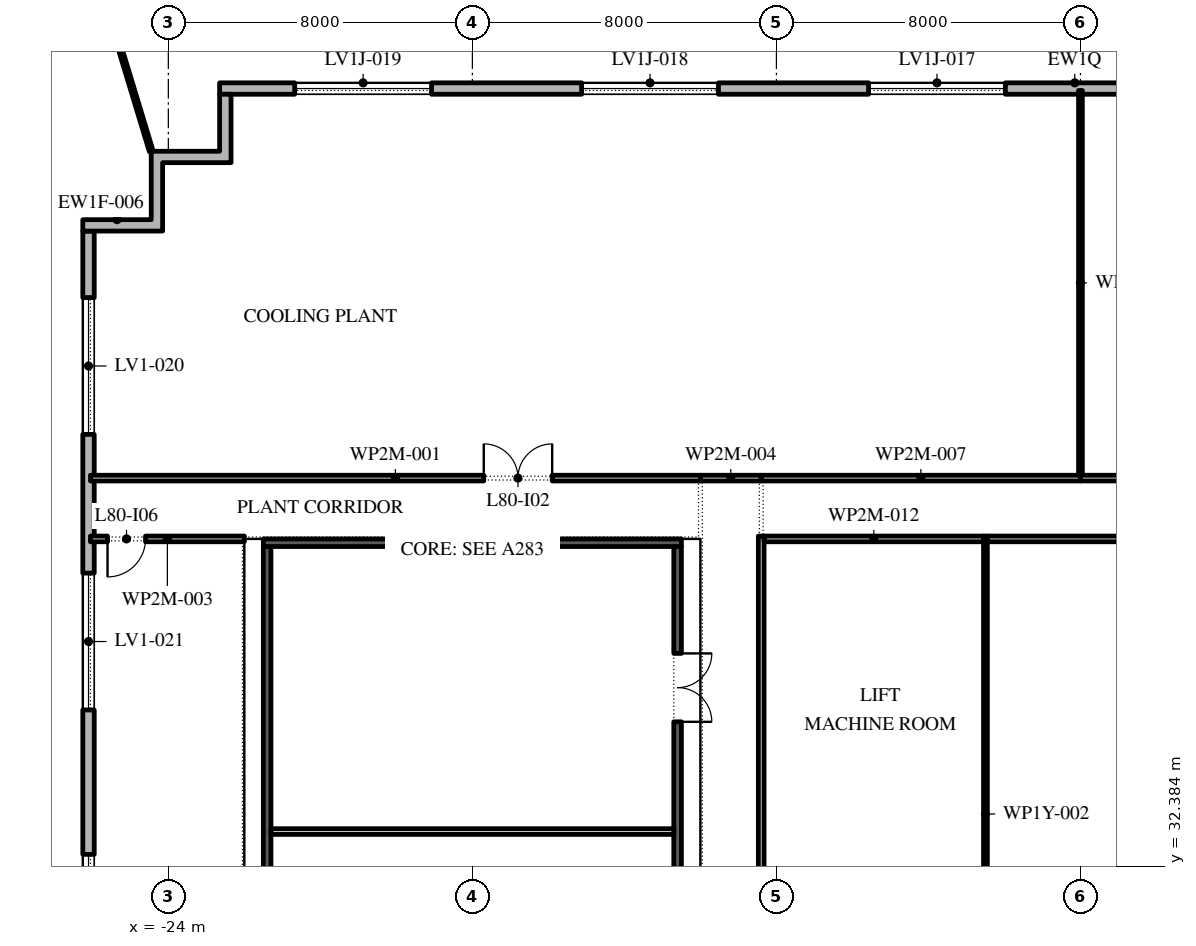
"""IFC4 building model, lengths in metres.
Left out: names, types, materials, properties, quantities, classifications, styles, units other than length and angle.
Written with IfcOpenShell. Run it as: python <this file> out.ifc"""

import sys

from ifc_helpers import new_model, si_unit, direction, frame, frame_2d, origin, place, context, subcontext, project, spatial, polyline, rectangle, outline, extrude, element, fill, save


model = new_model("IFC4")
c1 = context("Model", 3, precision=1e-05, world=origin(), true_north=direction((0.0, 1.0)))
c2 = subcontext(c1, "Body", "Model", "MODEL_VIEW")
j1 = project(units=[si_unit("LENGTHUNIT", "METRE"), si_unit("PLANEANGLEUNIT", "RADIAN")], contexts=[c1])
p1 = place(None, origin())
s1 = spatial("IfcSite", under=j1, at=p1, CompositionType="ELEMENT")
p2 = place(p1, origin())
s2 = spatial("IfcBuilding", under=s1, at=p2, CompositionType="ELEMENT")
p3 = place(p2, frame((0.0, 0.0, 363.6)))
s3 = spatial("IfcBuildingStorey", under=s2, at=p3, CompositionType="ELEMENT", Elevation=363.6)
p4 = place(p3, frame((22.35, 52.85, 0.0), z_axis=(0.0, 0.0, 1.0), x_axis=(-1.0, 0.0, 0.0)))
e1 = element("IfcWall", 1, at=p4, inside=s3, PredefinedType="STANDARD", context=c2, shape_type="SweptSolid", body=[
    extrude(rectangle(XDim=45.0, YDim=0.3, at=frame_2d((22.5, 0.0))), origin(), (0.0, 0.0, 1.0), 4.22),
])
p5 = place(p4, frame((1.825, 0.0, 0.6)))
e2 = element("IfcOpeningElement", 2, at=p5, cuts=e1, PredefinedType="OPENING", context=c2, shape_type="SweptSolid", body=[
    extrude(rectangle(XDim=3.6, YDim=3.5, at=frame_2d((1.8, 1.75))), frame((0.0, 0.16, 0.0), z_axis=(0.0, -1.0, 0.0), x_axis=(1.0, 0.0, 0.0)), (0.0, 0.0, 1.0), 0.32),
])
p6 = place(p4, frame((9.225, 0.0, 0.6)))
e3 = element("IfcOpeningElement", 3, at=p6, cuts=e1, PredefinedType="OPENING", context=c2, shape_type="SweptSolid", body=[
    extrude(rectangle(XDim=3.6, YDim=3.5, at=frame_2d((1.8, 1.75))), frame((0.0, 0.16, 0.0), z_axis=(0.0, -1.0, 0.0), x_axis=(1.0, 0.0, 0.0)), (0.0, 0.0, 1.0), 0.32),
])
p7 = place(p4, frame((16.775, 0.0, 0.6)))
e4 = element("IfcOpeningElement", 4, at=p7, cuts=e1, PredefinedType="OPENING", context=c2, shape_type="SweptSolid", body=[
    extrude(rectangle(XDim=3.6, YDim=3.5, at=frame_2d((1.8, 1.75))), frame((0.0, 0.16, 0.0), z_axis=(0.0, -1.0, 0.0), x_axis=(1.0, 0.0, 0.0)), (0.0, 0.0, 1.0), 0.32),
])
p8 = place(p4, frame((24.325, 0.0, 0.6)))
e5 = element("IfcOpeningElement", 5, at=p8, cuts=e1, PredefinedType="OPENING", context=c2, shape_type="SweptSolid", body=[
    extrude(rectangle(XDim=3.6, YDim=3.5, at=frame_2d((1.8, 1.75))), frame((0.0, 0.16, 0.0), z_axis=(0.0, -1.0, 0.0), x_axis=(1.0, 0.0, 0.0)), (0.0, 0.0, 1.0), 0.32),
])
p9 = place(p4, frame((31.875, 0.0, 0.6)))
e6 = element("IfcOpeningElement", 6, at=p9, cuts=e1, PredefinedType="OPENING", context=c2, shape_type="SweptSolid", body=[
    extrude(rectangle(XDim=3.6, YDim=3.5, at=frame_2d((1.8, 1.75))), frame((0.0, 0.16, 0.0), z_axis=(0.0, -1.0, 0.0), x_axis=(1.0, 0.0, 0.0)), (0.0, 0.0, 1.0), 0.32),
])
p10 = place(p4, frame((39.425, 0.0, 0.6)))
e7 = element("IfcOpeningElement", 7, at=p10, cuts=e1, PredefinedType="OPENING", context=c2, shape_type="SweptSolid", body=[
    extrude(rectangle(XDim=3.6, YDim=3.5, at=frame_2d((1.8, 1.75))), frame((0.0, 0.16, 0.0), z_axis=(0.0, -1.0, 0.0), x_axis=(1.0, 0.0, 0.0)), (0.0, 0.0, 1.0), 0.32),
])
p11 = place(p3, frame((-26.1, 49.1, 0.0), z_axis=(0.0, 0.0, 1.0), x_axis=(0.0, -1.0, 0.0)))
e8 = element("IfcWall", 8, at=p11, inside=s3, PredefinedType="STANDARD", context=c2, shape_type="SweptSolid", body=[
    extrude(rectangle(XDim=51.5, YDim=0.3, at=frame_2d((25.75, 0.0))), origin(), (0.0, 0.0, 1.0), 5.2),
])
p12 = place(p11, frame((1.75, 0.0, 0.6)))
e9 = element("IfcOpeningElement", 9, at=p12, cuts=e8, PredefinedType="OPENING", context=c2, shape_type="SweptSolid", body=[
    extrude(rectangle(XDim=3.6, YDim=4.15, at=frame_2d((1.8, 2.075))), frame((0.0, 0.16, 0.0), z_axis=(0.0, -1.0, 0.0), x_axis=(1.0, 0.0, 0.0)), (0.0, 0.0, 1.0), 0.32),
])
p13 = place(p11, frame((9.0, 0.0, 0.6)))
e10 = element("IfcOpeningElement", 10, at=p13, cuts=e8, PredefinedType="OPENING", context=c2, shape_type="SweptSolid", body=[
    extrude(rectangle(XDim=3.6, YDim=4.15, at=frame_2d((1.8, 2.075))), frame((0.0, 0.16, 0.0), z_axis=(0.0, -1.0, 0.0), x_axis=(1.0, 0.0, 0.0)), (0.0, 0.0, 1.0), 0.32),
])
p14 = place(p11, frame((16.4, 0.0, 0.6)))
e11 = element("IfcOpeningElement", 11, at=p14, cuts=e8, PredefinedType="OPENING", context=c2, shape_type="SweptSolid", body=[
    extrude(rectangle(XDim=3.6, YDim=4.15, at=frame_2d((1.8, 2.075))), frame((0.0, 0.16, 0.0), z_axis=(0.0, -1.0, 0.0), x_axis=(1.0, 0.0, 0.0)), (0.0, 0.0, 1.0), 0.32),
])
p15 = place(p11, frame((23.8, 0.0, 0.6)))
e12 = element("IfcOpeningElement", 12, at=p15, cuts=e8, PredefinedType="OPENING", context=c2, shape_type="SweptSolid", body=[
    extrude(rectangle(XDim=3.6, YDim=4.15, at=frame_2d((1.8, 2.075))), frame((0.0, 0.16, 0.0), z_axis=(0.0, -1.0, 0.0), x_axis=(1.0, 0.0, 0.0)), (0.0, 0.0, 1.0), 0.32),
])
p16 = place(p11, frame((31.2, 0.0, 0.6)))
e13 = element("IfcOpeningElement", 13, at=p16, cuts=e8, PredefinedType="OPENING", context=c2, shape_type="SweptSolid", body=[
    extrude(rectangle(XDim=3.6, YDim=4.15, at=frame_2d((1.8, 2.075))), frame((0.0, 0.16, 0.0), z_axis=(0.0, -1.0, 0.0), x_axis=(1.0, 0.0, 0.0)), (0.0, 0.0, 1.0), 0.32),
])
p17 = place(p11, frame((38.6, 0.0, 0.6)))
e14 = element("IfcOpeningElement", 14, at=p17, cuts=e8, PredefinedType="OPENING", context=c2, shape_type="SweptSolid", body=[
    extrude(rectangle(XDim=3.6, YDim=4.1, at=frame_2d((1.8, 2.05))), frame((0.0, 0.16, 0.0), z_axis=(0.0, -1.0, 0.0), x_axis=(1.0, 0.0, 0.0)), (0.0, 0.0, 1.0), 0.32),
])
p18 = place(p11, frame((46.0, 0.0, 0.6)))
e15 = element("IfcOpeningElement", 15, at=p18, cuts=e8, PredefinedType="OPENING", context=c2, shape_type="SweptSolid", body=[
    extrude(rectangle(XDim=3.6, YDim=4.1, at=frame_2d((1.8, 2.05))), frame((0.0, 0.16, 0.0), z_axis=(0.0, -1.0, 0.0), x_axis=(1.0, 0.0, 0.0)), (0.0, 0.0, 1.0), 0.32),
])
p19 = place(p3, origin())
e16 = element("IfcWall", 16, at=p19, inside=s3, PredefinedType="STANDARD", context=c2, shape_type="SweptSolid", body=[
    extrude(outline(polyline([(-24.45, 49.4), (-24.45, 51.2), (-22.65, 51.2), (-22.65, 52.7), (-22.35, 52.7), (-22.35, 50.9), (-24.15, 50.9), (-24.15, 49.1), (-26.25, 49.1), (-26.25, 49.4), (-24.45, 49.4)])), origin(), (0.0, 0.0, 1.0), 5.2),
])
p20 = place(p3, frame((-24.45, 51.2, -0.05), z_axis=(0.0, 0.0, 1.0), x_axis=(-0.290383107351, 0.956910471761, 0.0)))
e17 = element("IfcWall", 17, at=p20, inside=s3, PredefinedType="STANDARD", context=c2, shape_type="SweptSolid", body=[
    extrude(rectangle(XDim=7.538, YDim=0.1, at=frame_2d((3.769, 0.0))), origin(), (0.0, 0.0, 1.0), 5.25),
])
p21 = place(p3, frame((-21.4, 25.75, 0.0), z_axis=(0.0, 0.0, 1.0), x_axis=(0.0, 1.0, 0.0)))
e18 = element("IfcWall", 18, at=p21, inside=s3, PredefinedType="SHEAR", context=c2, shape_type="SweptSolid", body=[
    extrude(rectangle(XDim=15.05, YDim=0.2, at=frame_2d((7.525, 0.0))), origin(), (0.0, 0.0, 1.0), 5.2),
])
p22 = place(p3, frame((-10.6, 25.75, 0.0), z_axis=(0.0, 0.0, 1.0), x_axis=(0.0, 1.0, 0.0)))
e19 = element("IfcWall", 19, at=p22, inside=s3, PredefinedType="SHEAR", context=c2, shape_type="SweptSolid", body=[
    extrude(rectangle(XDim=15.05, YDim=0.2, at=frame_2d((7.525, 0.0))), origin(), (0.0, 0.0, 1.0), 5.2),
])
p23 = place(p22, frame((2.837, 0.0, 0.0)))
e20 = element("IfcOpeningElement", 20, at=p23, cuts=e19, PredefinedType="OPENING", context=c2, shape_type="SweptSolid", body=[
    extrude(rectangle(XDim=1.8, YDim=2.4, at=frame_2d((0.9, 1.2))), frame((0.0, 0.11, 0.0), z_axis=(0.0, -1.0, 0.0), x_axis=(1.0, 0.0, 0.0)), (0.0, 0.0, 1.0), 0.22),
])
p24 = place(p22, frame((10.438, 0.0, 0.0)))
e21 = element("IfcOpeningElement", 21, at=p24, cuts=e19, PredefinedType="OPENING", context=c2, shape_type="SweptSolid", body=[
    extrude(rectangle(XDim=1.8, YDim=2.4, at=frame_2d((0.9, 1.2))), frame((0.0, 0.11, 0.0), z_axis=(0.0, -1.0, 0.0), x_axis=(1.0, 0.0, 0.0)), (0.0, 0.0, 1.0), 0.22),
])
p25 = place(p3, frame((-21.5, 40.9, 0.0), z_axis=(0.0, 0.0, 1.0), x_axis=(1.0, 0.0, 0.0)))
e22 = element("IfcWall", 22, at=p25, inside=s3, PredefinedType="SHEAR", context=c2, shape_type="SweptSolid", body=[
    extrude(rectangle(XDim=11.0, YDim=0.2, at=frame_2d((5.5, 0.0))), origin(), (0.0, 0.0, 1.0), 5.2),
])
p26 = place(p3, frame((-21.3, 33.3, 0.0), z_axis=(0.0, 0.0, 1.0), x_axis=(1.0, 0.0, 0.0)))
e23 = element("IfcWall", 23, at=p26, inside=s3, PredefinedType="PARTITIONING", context=c2, shape_type="SweptSolid", body=[
    extrude(rectangle(XDim=10.6, YDim=0.15, at=frame_2d((5.3, 0.0))), origin(), (0.0, 0.0, 1.0), 5.2),
])
p27 = place(p3, frame((-26.05, 42.6, 0.0), z_axis=(0.0, 0.0, 1.0), x_axis=(1.0, 0.0, 0.0)))
e24 = element("IfcWall", 24, at=p27, inside=s3, PredefinedType="PARTITIONING", context=c2, shape_type="SweptSolid", body=[
    extrude(rectangle(XDim=16.05, YDim=0.15, at=frame_2d((8.025, 0.0))), origin(), (0.0, 0.0, 1.0), 5.2),
])
p28 = place(p27, frame((10.35, 0.0, 0.0)))
e25 = element("IfcOpeningElement", 25, at=p28, cuts=e24, PredefinedType="OPENING", context=c2, shape_type="SweptSolid", body=[
    extrude(rectangle(XDim=1.8, YDim=2.1, at=frame_2d((0.9, 1.05))), frame((0.0, 0.085, 0.0), z_axis=(0.0, -1.0, 0.0), x_axis=(1.0, 0.0, 0.0)), (0.0, 0.0, 1.0), 0.17),
])
p29 = place(p3, frame((-22.0, 41.0, 0.0), z_axis=(0.0, 0.0, 1.0), x_axis=(-1.0, 0.0, 0.0)))
e26 = element("IfcWall", 26, at=p29, inside=s3, PredefinedType="PARTITIONING", context=c2, shape_type="SweptSolid", body=[
    extrude(rectangle(XDim=4.05, YDim=0.15, at=frame_2d((2.025, 0.0))), origin(), (0.0, 0.0, 1.0), 5.2),
])
p30 = place(p29, frame((2.6, 0.0, 0.0)))
e27 = element("IfcOpeningElement", 27, at=p30, cuts=e26, PredefinedType="OPENING", context=c2, shape_type="SweptSolid", body=[
    extrude(rectangle(XDim=1.0, YDim=2.1, at=frame_2d((0.5, 1.05))), frame((0.0, 0.085, 0.0), z_axis=(0.0, -1.0, 0.0), x_axis=(1.0, 0.0, 0.0)), (0.0, 0.0, 1.0), 0.17),
])
p31 = place(p3, frame((-10.0, 42.6, 0.0), z_axis=(0.0, 0.0, 1.0), x_axis=(1.0, 0.0, 0.0)))
e28 = element("IfcWall", 28, at=p31, inside=s3, PredefinedType="PARTITIONING", context=c2, shape_type="SweptSolid", body=[
    extrude(rectangle(XDim=1.6, YDim=0.15, at=frame_2d((0.8, 0.0))), origin(), (0.0, 0.0, 1.0), 5.2),
])
p32 = place(p3, frame((-8.4, 41.075, 0.0), z_axis=(0.0, 0.0, 1.0), x_axis=(0.0, -1.0, 0.0)))
e29 = element("IfcWall", 29, at=p32, inside=s3, PredefinedType="PARTITIONING", context=c2, shape_type="SweptSolid", body=[
    extrude(rectangle(XDim=22.0, YDim=0.15, at=frame_2d((11.0, 0.0))), origin(), (0.0, 0.0, 1.0), 5.2),
])
p33 = place(p32, frame((14.925, 0.0, 0.0)))
e30 = element("IfcOpeningElement", 30, at=p33, cuts=e29, PredefinedType="OPENING", context=c2, shape_type="SweptSolid", body=[
    extrude(rectangle(XDim=1.0, YDim=2.1, at=frame_2d((0.5, 1.05))), frame((0.0, 0.085, 0.0), z_axis=(0.0, -1.0, 0.0), x_axis=(1.0, 0.0, 0.0)), (0.0, 0.0, 1.0), 0.17),
])
p34 = place(p3, frame((-8.4, 42.6, 0.0), z_axis=(0.0, 0.0, 1.0), x_axis=(1.0, 0.0, 0.0)))
e31 = element("IfcWall", 31, at=p34, inside=s3, PredefinedType="PARTITIONING", context=c2, shape_type="SweptSolid", body=[
    extrude(rectangle(XDim=8.4, YDim=0.15, at=frame_2d((4.2, 0.0))), origin(), (0.0, 0.0, 1.0), 5.2),
])
p35 = place(p3, frame((-2.5, 26.45, 0.0), z_axis=(0.0, 0.0, 1.0), x_axis=(0.0, 1.0, 0.0)))
e32 = element("IfcWall", 32, at=p35, inside=s3, PredefinedType="PARTITIONING", context=c2, shape_type="SweptSolid", body=[
    extrude(rectangle(XDim=14.625, YDim=0.1, at=frame_2d((7.312, 0.0))), origin(), (0.0, 0.0, 1.0), 4.22),
])
p36 = place(p3, frame((-2.55, 41.0, 0.0), z_axis=(0.0, 0.0, 1.0), x_axis=(-1.0, 0.0, 0.0)))
e33 = element("IfcWall", 33, at=p36, inside=s3, PredefinedType="PARTITIONING", context=c2, shape_type="SweptSolid", body=[
    extrude(rectangle(XDim=5.775, YDim=0.15, at=frame_2d((2.887, 0.0))), origin(), (0.0, 0.0, 1.0), 5.2),
])
p37 = place(p3, frame((0.0, 42.675, 0.0), z_axis=(0.0, 0.0, 1.0), x_axis=(0.0, 1.0, 0.0)))
e34 = element("IfcWall", 34, at=p37, inside=s3, PredefinedType="PARTITIONING", context=c2, shape_type="SweptSolid", body=[
    extrude(rectangle(XDim=10.125, YDim=0.1, at=frame_2d((5.062, 0.0))), origin(), (0.0, 0.0, 1.0), 5.2),
])
p38 = place(p3, frame((0.0, 42.6, 0.0), z_axis=(0.0, 0.0, 1.0), x_axis=(1.0, 0.0, 0.0)))
e35 = element("IfcWall", 35, at=p38, inside=s3, PredefinedType="PARTITIONING", context=c2, shape_type="SweptSolid", body=[
    extrude(rectangle(XDim=26.05, YDim=0.15, at=frame_2d((13.025, 0.0))), origin(), (0.0, 0.0, 1.0), 5.2),
])
p39 = place(p38, frame((7.05, 0.0, 0.0)))
e36 = element("IfcOpeningElement", 36, at=p39, cuts=e35, PredefinedType="OPENING", context=c2, shape_type="SweptSolid", body=[
    extrude(rectangle(XDim=1.8, YDim=2.1, at=frame_2d((0.9, 1.05))), frame((0.0, 0.085, 0.0), z_axis=(0.0, -1.0, 0.0), x_axis=(1.0, 0.0, 0.0)), (0.0, 0.0, 1.0), 0.17),
])
p40 = place(p3, frame((8.325, 41.0, 0.0), z_axis=(0.0, 0.0, 1.0), x_axis=(-1.0, 0.0, 0.0)))
e37 = element("IfcWall", 37, at=p40, inside=s3, PredefinedType="PARTITIONING", context=c2, shape_type="SweptSolid", body=[
    extrude(rectangle(XDim=10.775, YDim=0.15, at=frame_2d((5.387, 0.0))), origin(), (0.0, 0.0, 1.0), 5.2),
])
p41 = place(p8, origin())
e38 = element("IfcWindow", 38, at=p41, inside=s3, PartitioningType="DOUBLE_PANEL_HORIZONTAL", PredefinedType="WINDOW", context=c2, shape_type="SweptSolid", body=[
    extrude(rectangle(XDim=3.6, YDim=3.5, at=frame_2d((1.8, 1.75))), frame((0.0, 0.03, 0.0), z_axis=(0.0, -1.0, 0.0), x_axis=(1.0, 0.0, 0.0)), (0.0, 0.0, 1.0), 0.06),
])
fill(e5, e38)
p42 = place(p9, origin())
e39 = element("IfcWindow", 39, at=p42, inside=s3, PartitioningType="DOUBLE_PANEL_HORIZONTAL", PredefinedType="WINDOW", context=c2, shape_type="SweptSolid", body=[
    extrude(rectangle(XDim=3.6, YDim=3.5, at=frame_2d((1.8, 1.75))), frame((0.0, 0.03, 0.0), z_axis=(0.0, -1.0, 0.0), x_axis=(1.0, 0.0, 0.0)), (0.0, 0.0, 1.0), 0.06),
])
fill(e6, e39)
p43 = place(p10, origin())
e40 = element("IfcWindow", 40, at=p43, inside=s3, PartitioningType="DOUBLE_PANEL_HORIZONTAL", PredefinedType="WINDOW", context=c2, shape_type="SweptSolid", body=[
    extrude(rectangle(XDim=3.6, YDim=3.5, at=frame_2d((1.8, 1.75))), frame((0.0, 0.03, 0.0), z_axis=(0.0, -1.0, 0.0), x_axis=(1.0, 0.0, 0.0)), (0.0, 0.0, 1.0), 0.06),
])
fill(e7, e40)
p44 = place(p12, origin())
e41 = element("IfcWindow", 41, at=p44, inside=s3, PartitioningType="DOUBLE_PANEL_HORIZONTAL", PredefinedType="WINDOW", context=c2, shape_type="SweptSolid", body=[
    extrude(rectangle(XDim=3.6, YDim=4.15, at=frame_2d((1.8, 2.075))), frame((0.0, 0.03, 0.0), z_axis=(0.0, -1.0, 0.0), x_axis=(1.0, 0.0, 0.0)), (0.0, 0.0, 1.0), 0.06),
])
fill(e9, e41)
p45 = place(p13, origin())
e42 = element("IfcWindow", 42, at=p45, inside=s3, PartitioningType="DOUBLE_PANEL_HORIZONTAL", PredefinedType="WINDOW", context=c2, shape_type="SweptSolid", body=[
    extrude(rectangle(XDim=3.6, YDim=4.15, at=frame_2d((1.8, 2.075))), frame((0.0, 0.03, 0.0), z_axis=(0.0, -1.0, 0.0), x_axis=(1.0, 0.0, 0.0)), (0.0, 0.0, 1.0), 0.06),
])
fill(e10, e42)
p46 = place(p14, origin())
e43 = element("IfcWindow", 43, at=p46, inside=s3, PartitioningType="DOUBLE_PANEL_HORIZONTAL", PredefinedType="WINDOW", context=c2, shape_type="SweptSolid", body=[
    extrude(rectangle(XDim=3.6, YDim=4.15, at=frame_2d((1.8, 2.075))), frame((0.0, 0.03, 0.0), z_axis=(0.0, -1.0, 0.0), x_axis=(1.0, 0.0, 0.0)), (0.0, 0.0, 1.0), 0.06),
])
fill(e11, e43)
p47 = place(p24, frame((1.8, 0.15, 0.0), z_axis=(0.0, 0.0, 1.0), x_axis=(-1.0, 0.0, 0.0)))
e44 = element("IfcDoor", 44, at=p47, inside=s3, OperationType="DOUBLE_DOOR_SINGLE_SWING", PredefinedType="DOOR", context=c2, shape_type="SweptSolid", body=[
    extrude(rectangle(XDim=1.8, YDim=2.4, at=frame_2d((0.9, 1.2))), frame((0.0, 0.1, 0.0), z_axis=(0.0, -1.0, 0.0), x_axis=(1.0, 0.0, 0.0)), (0.0, 0.0, 1.0), 0.05),
])
fill(e21, e44)
p48 = place(p28, origin())
e45 = element("IfcDoor", 45, at=p48, inside=s3, OperationType="SINGLE_SWING_RIGHT", PredefinedType="DOOR", context=c2, shape_type="SweptSolid", body=[
    extrude(rectangle(XDim=1.8, YDim=2.1, at=frame_2d((0.9, 1.05))), frame((0.0, 0.025, 0.0), z_axis=(0.0, -1.0, 0.0), x_axis=(1.0, 0.0, 0.0)), (0.0, 0.0, 1.0), 0.05),
])
fill(e25, e45)
p49 = place(p30, origin())
e46 = element("IfcDoor", 46, at=p49, inside=s3, OperationType="SINGLE_SWING_LEFT", PredefinedType="DOOR", context=c2, shape_type="SweptSolid", body=[
    extrude(rectangle(XDim=1.0, YDim=2.1, at=frame_2d((0.5, 1.05))), frame((0.0, 0.025, 0.0), z_axis=(0.0, -1.0, 0.0), x_axis=(1.0, 0.0, 0.0)), (0.0, 0.0, 1.0), 0.05),
])
fill(e27, e46)
save(model, sys.argv[1])
